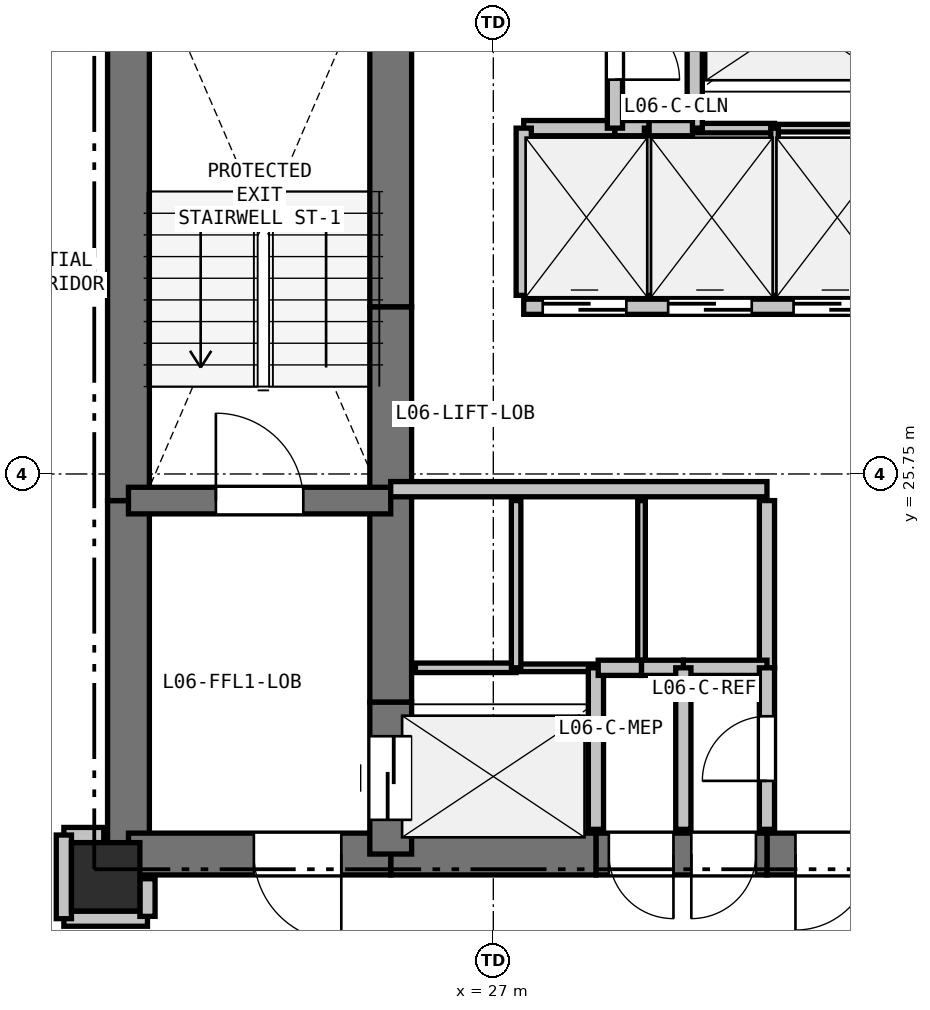
"""IFC4 building model, lengths in metres.
Left out: names, types, materials, properties, quantities, classifications, styles, units other than length and angle.
Written with IfcOpenShell. Run it as: python <this file> out.ifc"""

import sys

from ifc_helpers import new_model, si_unit, direction, frame, frame_2d, origin, origin_2d, place, context, subcontext, project, spatial, rectangle, extrude, element, fill, save


model = new_model("IFC4")
c1 = context("Model", 3, precision=1e-05, world=origin(), true_north=direction((0.0, 1.0)))
c2 = subcontext(c1, "Body", "Model", "MODEL_VIEW")
j1 = project(units=[si_unit("LENGTHUNIT", "METRE"), si_unit("PLANEANGLEUNIT", "RADIAN")], contexts=[c1])
p1 = place(None, origin())
s1 = spatial("IfcSite", under=j1, at=p1, CompositionType="ELEMENT")
p2 = place(p1, origin())
s2 = spatial("IfcBuilding", under=s1, at=p2, CompositionType="ELEMENT")
p3 = place(p2, frame((0.0, 0.0, 25.8)))
s3 = spatial("IfcBuildingStorey", under=s2, at=p3, CompositionType="ELEMENT", Elevation=25.8)
p4 = place(p3, frame((21.9, 20.45, 0.0), z_axis=(0.0, 0.0, 1.0), x_axis=(1.0, 0.0, 0.0)))
e1 = element("IfcColumn", 1, at=p4, inside=s3, PredefinedType="COLUMN", context=c2, shape_type="SweptSolid", body=[
    extrude(rectangle(XDim=0.9, YDim=0.9, at=origin_2d()), origin(), (0.0, 0.0, 1.0), 3.3),
])
p5 = place(p3, frame((22.2, 20.75, 0.0), z_axis=(0.0, 0.0, 1.0), x_axis=(0.0, 1.0, 0.0)))
e2 = element("IfcWall", 2, at=p5, inside=s3, PredefinedType="SHEAR", context=c2, shape_type="SweptSolid", body=[
    extrude(rectangle(XDim=4.65, YDim=0.55, at=frame_2d((2.325, 0.0))), origin(), (0.0, 0.0, 1.0), 3.04),
])
p6 = place(p3, frame((22.2, 25.4, 0.0), z_axis=(0.0, 0.0, 1.0), x_axis=(0.0, 1.0, 0.0)))
e3 = element("IfcWall", 3, at=p6, inside=s3, PredefinedType="SHEAR", context=c2, shape_type="SweptSolid", body=[
    extrude(rectangle(XDim=7.35, YDim=0.55, at=frame_2d((3.675, 0.0))), origin(), (0.0, 0.0, 1.0), 3.04),
])
p7 = place(p3, frame((32.35, 20.75, 0.0), z_axis=(0.0, 0.0, 1.0), x_axis=(-1.0, 0.0, 0.0)))
e4 = element("IfcWall", 4, at=p7, inside=s3, PredefinedType="SHEAR", context=c2, shape_type="SweptSolid", body=[
    extrude(rectangle(XDim=1.75, YDim=0.55, at=frame_2d((0.875, 0.0))), origin(), (0.0, 0.0, 1.0), 3.04),
])
p8 = place(p7, frame((0.375, 0.0, 0.0)))
e5 = element("IfcOpeningElement", 5, at=p8, cuts=e4, PredefinedType="OPENING", context=c2, shape_type="SweptSolid", body=[
    extrude(rectangle(XDim=1.0, YDim=2.15, at=frame_2d((0.5, 1.075))), frame((0.0, 0.285, 0.0), z_axis=(0.0, -1.0, 0.0), x_axis=(1.0, 0.0, 0.0)), (0.0, 0.0, 1.0), 0.57),
])
p9 = place(p3, frame((30.6, 20.75, 0.0), z_axis=(0.0, 0.0, 1.0), x_axis=(-1.0, 0.0, 0.0)))
e6 = element("IfcWall", 6, at=p9, inside=s3, PredefinedType="SHEAR", context=c2, shape_type="SweptSolid", body=[
    extrude(rectangle(XDim=2.25, YDim=0.55, at=frame_2d((1.125, 0.0))), origin(), (0.0, 0.0, 1.0), 3.04),
])
p10 = place(p9, frame((1.23, 0.0, 0.0)))
e7 = element("IfcOpeningElement", 7, at=p10, cuts=e6, PredefinedType="OPENING", context=c2, shape_type="SweptSolid", body=[
    extrude(rectangle(XDim=0.85, YDim=2.1, at=frame_2d((0.425, 1.05))), frame((0.0, 0.285, 0.0), z_axis=(0.0, -1.0, 0.0), x_axis=(1.0, 0.0, 0.0)), (0.0, 0.0, 1.0), 0.57),
])
p11 = place(p9, frame((0.145, 0.0, 0.0)))
e8 = element("IfcOpeningElement", 8, at=p11, cuts=e6, PredefinedType="OPENING", context=c2, shape_type="SweptSolid", body=[
    extrude(rectangle(XDim=0.85, YDim=2.1, at=frame_2d((0.425, 1.05))), frame((0.0, 0.285, 0.0), z_axis=(0.0, -1.0, 0.0), x_axis=(1.0, 0.0, 0.0)), (0.0, 0.0, 1.0), 0.57),
])
p12 = place(p3, frame((28.35, 20.75, 0.0), z_axis=(0.0, 0.0, 1.0), x_axis=(-1.0, 0.0, 0.0)))
e9 = element("IfcWall", 9, at=p12, inside=s3, PredefinedType="SHEAR", context=c2, shape_type="SweptSolid", body=[
    extrude(rectangle(XDim=2.7, YDim=0.55, at=frame_2d((1.35, 0.0))), origin(), (0.0, 0.0, 1.0), 3.04),
])
p13 = place(p3, frame((25.65, 20.75, 0.0), z_axis=(0.0, 0.0, 1.0), x_axis=(-1.0, 0.0, 0.0)))
e10 = element("IfcWall", 10, at=p13, inside=s3, PredefinedType="SHEAR", context=c2, shape_type="SweptSolid", body=[
    extrude(rectangle(XDim=3.45, YDim=0.55, at=frame_2d((1.725, 0.0))), origin(), (0.0, 0.0, 1.0), 3.04),
])
p14 = place(p13, frame((0.65, 0.0, 0.0)))
e11 = element("IfcOpeningElement", 11, at=p14, cuts=e10, PredefinedType="OPENING", context=c2, shape_type="SweptSolid", body=[
    extrude(rectangle(XDim=1.15, YDim=2.15, at=frame_2d((0.575, 1.075))), frame((0.0, 0.285, 0.0), z_axis=(0.0, -1.0, 0.0), x_axis=(1.0, 0.0, 0.0)), (0.0, 0.0, 1.0), 0.57),
])
p15 = place(p3, frame((25.65, 20.75, 0.0), z_axis=(0.0, 0.0, 1.0), x_axis=(0.0, 1.0, 0.0)))
e12 = element("IfcWall", 12, at=p15, inside=s3, PredefinedType="SHEAR", context=c2, shape_type="SweptSolid", body=[
    extrude(rectangle(XDim=2.0, YDim=0.55, at=frame_2d((1.0, 0.0))), origin(), (0.0, 0.0, 1.0), 3.04),
])
p16 = place(p15, frame((0.45, 0.0, 0.0)))
e13 = element("IfcOpeningElement", 13, at=p16, cuts=e12, PredefinedType="OPENING", context=c2, shape_type="SweptSolid", body=[
    extrude(rectangle(XDim=1.1, YDim=2.15, at=frame_2d((0.55, 1.075))), frame((0.0, 0.285, 0.0), z_axis=(0.0, -1.0, 0.0), x_axis=(1.0, 0.0, 0.0)), (0.0, 0.0, 1.0), 0.57),
])
p17 = place(p3, frame((25.65, 22.75, 0.0), z_axis=(0.0, 0.0, 1.0), x_axis=(0.0, 1.0, 0.0)))
e14 = element("IfcWall", 14, at=p17, inside=s3, PredefinedType="SHEAR", context=c2, shape_type="SweptSolid", body=[
    extrude(rectangle(XDim=2.8, YDim=0.55, at=frame_2d((1.4, 0.0))), origin(), (0.0, 0.0, 1.0), 3.04),
])
p18 = place(p3, frame((25.65, 25.55, 0.0), z_axis=(0.0, 0.0, 1.0), x_axis=(0.0, 1.0, 0.0)))
e15 = element("IfcWall", 15, at=p18, inside=s3, PredefinedType="SHEAR", context=c2, shape_type="SweptSolid", body=[
    extrude(rectangle(XDim=2.4, YDim=0.55, at=frame_2d((1.2, 0.0))), origin(), (0.0, 0.0, 1.0), 3.04),
])
p19 = place(p3, frame((25.65, 27.95, 0.0), z_axis=(0.0, 0.0, 1.0), x_axis=(0.0, 1.0, 0.0)))
e16 = element("IfcWall", 16, at=p19, inside=s3, PredefinedType="SHEAR", context=c2, shape_type="SweptSolid", body=[
    extrude(rectangle(XDim=4.8, YDim=0.55, at=frame_2d((2.4, 0.0))), origin(), (0.0, 0.0, 1.0), 3.04),
])
p20 = place(p3, frame((22.2, 25.4, 0.0), z_axis=(0.0, 0.0, 1.0), x_axis=(1.0, 0.0, 0.0)))
e17 = element("IfcWall", 17, at=p20, inside=s3, PredefinedType="SHEAR", context=c2, shape_type="SweptSolid", body=[
    extrude(rectangle(XDim=3.45, YDim=0.35, at=frame_2d((1.725, 0.0))), origin(), (0.0, 0.0, 1.0), 3.04),
])
p21 = place(p20, frame((1.15, 0.0, 0.0)))
e18 = element("IfcOpeningElement", 18, at=p21, cuts=e17, PredefinedType="OPENING", context=c2, shape_type="SweptSolid", body=[
    extrude(rectangle(XDim=1.15, YDim=2.15, at=frame_2d((0.575, 1.075))), frame((0.0, 0.185, 0.0), z_axis=(0.0, -1.0, 0.0), x_axis=(1.0, 0.0, 0.0)), (0.0, 0.0, 1.0), 0.37),
])
p22 = place(p3, frame((25.65, 25.55, 0.0), z_axis=(0.0, 0.0, 1.0), x_axis=(1.0, 0.0, 0.0)))
e19 = element("IfcWall", 19, at=p22, inside=s3, PredefinedType="PARTITIONING", context=c2, shape_type="SweptSolid", body=[
    extrude(rectangle(XDim=4.95, YDim=0.2, at=frame_2d((2.475, 0.0))), origin(), (0.0, 0.0, 1.0), 3.04),
])
p23 = place(p3, frame((27.4, 27.95, 0.0), z_axis=(0.0, 0.0, 1.0), x_axis=(1.0, 0.0, 0.0)))
e20 = element("IfcWall", 20, at=p23, inside=s3, PredefinedType="PARTITIONING", context=c2, shape_type="SweptSolid", body=[
    extrude(rectangle(XDim=4.95, YDim=0.2, at=frame_2d((2.475, 0.0))), origin(), (0.0, 0.0, 1.0), 3.04),
])
p24 = place(p23, frame((0.25, 0.0, 0.0)))
e21 = element("IfcOpeningElement", 21, at=p24, cuts=e20, PredefinedType="OPENING", context=c2, shape_type="SweptSolid", body=[
    extrude(rectangle(XDim=1.1, YDim=2.15, at=frame_2d((0.55, 1.075))), frame((0.0, 0.11, 0.0), z_axis=(0.0, -1.0, 0.0), x_axis=(1.0, 0.0, 0.0)), (0.0, 0.0, 1.0), 0.22),
])
p25 = place(p23, frame((1.9, 0.0, 0.0)))
e22 = element("IfcOpeningElement", 22, at=p25, cuts=e20, PredefinedType="OPENING", context=c2, shape_type="SweptSolid", body=[
    extrude(rectangle(XDim=1.1, YDim=2.15, at=frame_2d((0.55, 1.075))), frame((0.0, 0.11, 0.0), z_axis=(0.0, -1.0, 0.0), x_axis=(1.0, 0.0, 0.0)), (0.0, 0.0, 1.0), 0.22),
])
p26 = place(p23, frame((3.55, 0.0, 0.0)))
e23 = element("IfcOpeningElement", 23, at=p26, cuts=e20, PredefinedType="OPENING", context=c2, shape_type="SweptSolid", body=[
    extrude(rectangle(XDim=1.1, YDim=2.15, at=frame_2d((0.55, 1.075))), frame((0.0, 0.11, 0.0), z_axis=(0.0, -1.0, 0.0), x_axis=(1.0, 0.0, 0.0)), (0.0, 0.0, 1.0), 0.22),
])
p27 = place(p3, frame((25.975, 23.2, 0.0), z_axis=(0.0, 0.0, 1.0), x_axis=(1.0, 0.0, 0.0)))
e24 = element("IfcWall", 24, at=p27, inside=s3, PredefinedType="PARTITIONING", context=c2, shape_type="SweptSolid", body=[
    extrude(rectangle(XDim=1.325, YDim=0.125, at=frame_2d((0.663, 0.0))), origin(), (0.0, 0.0, 1.0), 3.04),
])
p28 = place(p3, frame((27.3, 23.2, 0.0), z_axis=(0.0, 0.0, 1.0), x_axis=(1.0, 0.0, 0.0)))
e25 = element("IfcWall", 25, at=p28, inside=s3, PredefinedType="PARTITIONING", context=c2, shape_type="SweptSolid", body=[
    extrude(rectangle(XDim=1.05, YDim=0.1, at=frame_2d((0.525, 0.0))), origin(), (0.0, 0.0, 1.0), 3.04),
])
p29 = place(p3, frame((28.35, 23.2, 0.0), z_axis=(0.0, 0.0, 1.0), x_axis=(0.0, -1.0, 0.0)))
e26 = element("IfcWall", 26, at=p29, inside=s3, PredefinedType="PARTITIONING", context=c2, shape_type="SweptSolid", body=[
    extrude(rectangle(XDim=2.125, YDim=0.2, at=frame_2d((1.062, 0.0))), origin(), (0.0, 0.0, 1.0), 3.04),
])
p30 = place(p3, frame((32.025, 30.3, 0.0), z_axis=(0.0, 0.0, 1.0), x_axis=(-1.0, 0.0, 0.0)))
e27 = element("IfcWall", 27, at=p30, inside=s3, PredefinedType="PARTITIONING", context=c2, shape_type="SweptSolid", body=[
    extrude(rectangle(XDim=1.325, YDim=0.1, at=frame_2d((0.663, 0.0))), origin(), (0.0, 0.0, 1.0), 3.04),
])
p31 = place(p3, frame((30.7, 30.3, 0.0), z_axis=(0.0, 0.0, 1.0), x_axis=(-1.0, 0.0, 0.0)))
e28 = element("IfcWall", 28, at=p31, inside=s3, PredefinedType="PARTITIONING", context=c2, shape_type="SweptSolid", body=[
    extrude(rectangle(XDim=1.05, YDim=0.125, at=frame_2d((0.525, 0.0))), origin(), (0.0, 0.0, 1.0), 3.04),
])
p32 = place(p3, frame((29.65, 30.3, 0.0), z_axis=(0.0, 0.0, 1.0), x_axis=(0.0, 1.0, 0.0)))
e29 = element("IfcWall", 29, at=p32, inside=s3, PredefinedType="PARTITIONING", context=c2, shape_type="SweptSolid", body=[
    extrude(rectangle(XDim=2.125, YDim=0.2, at=frame_2d((1.062, 0.0))), origin(), (0.0, 0.0, 1.0), 3.04),
])
p33 = place(p3, frame((27.3, 25.4, 0.0), z_axis=(0.0, 0.0, 1.0), x_axis=(0.0, -1.0, 0.0)))
e30 = element("IfcWall", 30, at=p33, inside=s3, PredefinedType="PARTITIONING", context=c2, shape_type="SweptSolid", body=[
    extrude(rectangle(XDim=2.2, YDim=0.125, at=frame_2d((1.1, 0.0))), origin(), (0.0, 0.0, 1.0), 3.04),
])
p34 = place(p3, frame((28.95, 25.4, 0.0), z_axis=(0.0, 0.0, 1.0), x_axis=(0.0, -1.0, 0.0)))
e31 = element("IfcWall", 31, at=p34, inside=s3, PredefinedType="PARTITIONING", context=c2, shape_type="SweptSolid", body=[
    extrude(rectangle(XDim=2.2, YDim=0.1, at=frame_2d((1.1, 0.0))), origin(), (0.0, 0.0, 1.0), 3.04),
])
p35 = place(p3, frame((28.95, 23.2, 0.0), z_axis=(0.0, 0.0, 1.0), x_axis=(-1.0, 0.0, 0.0)))
e32 = element("IfcWall", 32, at=p35, inside=s3, PredefinedType="PARTITIONING", context=c2, shape_type="SweptSolid", body=[
    extrude(rectangle(XDim=0.57, YDim=0.2, at=frame_2d((0.285, 0.0))), origin(), (0.0, 0.0, 1.0), 3.04),
])
p36 = place(p3, frame((30.6, 25.4, 0.0), z_axis=(0.0, 0.0, 1.0), x_axis=(0.0, -1.0, 0.0)))
e33 = element("IfcWall", 33, at=p36, inside=s3, PredefinedType="PARTITIONING", context=c2, shape_type="SweptSolid", body=[
    extrude(rectangle(XDim=2.2, YDim=0.2, at=frame_2d((1.1, 0.0))), origin(), (0.0, 0.0, 1.0), 3.04),
])
p37 = place(p3, frame((30.6, 23.2, 0.0), z_axis=(0.0, 0.0, 1.0), x_axis=(-1.0, 0.0, 0.0)))
e34 = element("IfcWall", 34, at=p37, inside=s3, PredefinedType="PARTITIONING", context=c2, shape_type="SweptSolid", body=[
    extrude(rectangle(XDim=1.1, YDim=0.2, at=frame_2d((0.55, 0.0))), origin(), (0.0, 0.0, 1.0), 3.04),
])
p38 = place(p3, frame((29.5, 23.2, 0.0), z_axis=(0.0, 0.0, 1.0), x_axis=(-1.0, 0.0, 0.0)))
e35 = element("IfcWall", 35, at=p38, inside=s3, PredefinedType="PARTITIONING", context=c2, shape_type="SweptSolid", body=[
    extrude(rectangle(XDim=0.55, YDim=0.2, at=frame_2d((0.275, 0.0))), origin(), (0.0, 0.0, 1.0), 3.04),
])
p39 = place(p3, frame((27.4, 30.3, 0.0), z_axis=(0.0, 0.0, 1.0), x_axis=(1.0, 0.0, 0.0)))
e36 = element("IfcWall", 36, at=p39, inside=s3, PredefinedType="PARTITIONING", context=c2, shape_type="SweptSolid", body=[
    extrude(rectangle(XDim=1.2, YDim=0.2, at=frame_2d((0.6, 0.0))), origin(), (0.0, 0.0, 1.0), 3.04),
])
p40 = place(p3, frame((28.6, 30.3, 0.0), z_axis=(0.0, 0.0, 1.0), x_axis=(1.0, 0.0, 0.0)))
e37 = element("IfcWall", 37, at=p40, inside=s3, PredefinedType="PARTITIONING", context=c2, shape_type="SweptSolid", body=[
    extrude(rectangle(XDim=0.45, YDim=0.2, at=frame_2d((0.225, 0.0))), origin(), (0.0, 0.0, 1.0), 3.04),
])
p41 = place(p3, frame((29.05, 30.3, 0.0), z_axis=(0.0, 0.0, 1.0), x_axis=(0.0, -1.0, 0.0)))
e38 = element("IfcWall", 38, at=p41, inside=s3, PredefinedType="PARTITIONING", context=c2, shape_type="SweptSolid", body=[
    extrude(rectangle(XDim=2.2, YDim=0.125, at=frame_2d((1.1, 0.0))), origin(), (0.0, 0.0, 1.0), 3.04),
])
p42 = place(p3, frame((27.4, 28.1, 0.0), z_axis=(0.0, 0.0, 1.0), x_axis=(0.0, 1.0, 0.0)))
e39 = element("IfcWall", 39, at=p42, inside=s3, PredefinedType="PARTITIONING", context=c2, shape_type="SweptSolid", body=[
    extrude(rectangle(XDim=2.2, YDim=0.2, at=frame_2d((1.1, 0.0))), origin(), (0.0, 0.0, 1.0), 3.04),
])
p43 = place(p3, frame((29.05, 30.3, 0.0), z_axis=(0.0, 0.0, 1.0), x_axis=(1.0, 0.0, 0.0)))
e40 = element("IfcWall", 40, at=p43, inside=s3, PredefinedType="PARTITIONING", context=c2, shape_type="SweptSolid", body=[
    extrude(rectangle(XDim=0.57, YDim=0.2, at=frame_2d((0.285, 0.0))), origin(), (0.0, 0.0, 1.0), 3.04),
])
p44 = place(p3, frame((30.7, 30.3, 0.0), z_axis=(0.0, 0.0, 1.0), x_axis=(0.0, -1.0, 0.0)))
e41 = element("IfcWall", 41, at=p44, inside=s3, PredefinedType="PARTITIONING", context=c2, shape_type="SweptSolid", body=[
    extrude(rectangle(XDim=2.2, YDim=0.1, at=frame_2d((1.1, 0.0))), origin(), (0.0, 0.0, 1.0), 3.04),
])
p45 = place(p3, frame((30.6, 21.075, 0.0), z_axis=(0.0, 0.0, 1.0), x_axis=(0.0, 1.0, 0.0)))
e42 = element("IfcWall", 42, at=p45, inside=s3, PredefinedType="PARTITIONING", context=c2, shape_type="SweptSolid", body=[
    extrude(rectangle(XDim=2.125, YDim=0.2, at=frame_2d((1.062, 0.0))), origin(), (0.0, 0.0, 1.0), 3.04),
])
p46 = place(p45, frame((0.637, 0.0, 0.0)))
e43 = element("IfcOpeningElement", 43, at=p46, cuts=e42, PredefinedType="OPENING", context=c2, shape_type="SweptSolid", body=[
    extrude(rectangle(XDim=0.85, YDim=2.1, at=frame_2d((0.425, 1.05))), frame((0.0, 0.11, 0.0), z_axis=(0.0, -1.0, 0.0), x_axis=(1.0, 0.0, 0.0)), (0.0, 0.0, 1.0), 0.22),
])
p47 = place(p3, frame((28.6, 32.425, 0.0), z_axis=(0.0, 0.0, 1.0), x_axis=(0.0, -1.0, 0.0)))
e44 = element("IfcWall", 44, at=p47, inside=s3, PredefinedType="PARTITIONING", context=c2, shape_type="SweptSolid", body=[
    extrude(rectangle(XDim=2.125, YDim=0.2, at=frame_2d((1.062, 0.0))), origin(), (0.0, 0.0, 1.0), 3.04),
])
p48 = place(p47, frame((0.637, 0.0, 0.0)))
e45 = element("IfcOpeningElement", 45, at=p48, cuts=e44, PredefinedType="OPENING", context=c2, shape_type="SweptSolid", body=[
    extrude(rectangle(XDim=0.85, YDim=2.1, at=frame_2d((0.425, 1.05))), frame((0.0, 0.11, 0.0), z_axis=(0.0, -1.0, 0.0), x_axis=(1.0, 0.0, 0.0)), (0.0, 0.0, 1.0), 0.22),
])
p49 = place(p3, frame((21.35, 19.9, 0.0), z_axis=(0.0, 0.0, 1.0), x_axis=(1.0, 0.0, 0.0)))
e46 = element("IfcWall", 46, at=p49, inside=s3, PredefinedType="PARTITIONING", context=c2, shape_type="SweptSolid", body=[
    extrude(rectangle(XDim=1.1, YDim=0.2, at=frame_2d((0.55, 0.0))), origin(), (0.0, 0.0, 1.0), 2.337),
])
p50 = place(p3, frame((22.45, 19.93, 0.0), z_axis=(0.0, 0.0, 1.0), x_axis=(0.0, 1.0, 0.0)))
e47 = element("IfcWall", 47, at=p50, inside=s3, PredefinedType="PARTITIONING", context=c2, shape_type="SweptSolid", body=[
    extrude(rectangle(XDim=0.495, YDim=0.2, at=frame_2d((0.248, 0.0))), origin(), (0.0, 0.0, 1.0), 2.337),
])
p51 = place(p3, frame((21.875, 21.0, 0.0), z_axis=(0.0, 0.0, 1.0), x_axis=(-1.0, 0.0, 0.0)))
e48 = element("IfcWall", 48, at=p51, inside=s3, PredefinedType="PARTITIONING", context=c2, shape_type="SweptSolid", body=[
    extrude(rectangle(XDim=0.525, YDim=0.2, at=frame_2d((0.262, 0.0))), origin(), (0.0, 0.0, 1.0), 2.488),
])
p52 = place(p3, frame((21.35, 21.0, 0.0), z_axis=(0.0, 0.0, 1.0), x_axis=(0.0, -1.0, 0.0)))
e49 = element("IfcWall", 49, at=p52, inside=s3, PredefinedType="PARTITIONING", context=c2, shape_type="SweptSolid", body=[
    extrude(rectangle(XDim=1.1, YDim=0.2, at=frame_2d((0.55, 0.0))), origin(), (0.0, 0.0, 1.0), 2.337),
])
p53 = place(p3, frame((29.5, 23.2, 0.0), z_axis=(0.0, 0.0, 1.0), x_axis=(0.0, -1.0, 0.0)))
e50 = element("IfcWall", 50, at=p53, inside=s3, PredefinedType="PARTITIONING", context=c2, shape_type="SweptSolid", body=[
    extrude(rectangle(XDim=2.125, YDim=0.2, at=frame_2d((1.062, 0.0))), origin(), (0.0, 0.0, 1.0), 3.04),
])
p54 = place(p24, origin())
e51 = element("IfcDoor", 51, at=p54, inside=s3, OperationType="SLIDING_TO_LEFT", PredefinedType="DOOR", context=c2, shape_type="SweptSolid", body=[
    extrude(rectangle(XDim=1.1, YDim=2.15, at=frame_2d((0.55, 1.075))), frame((0.0, 0.025, 0.0), z_axis=(0.0, -1.0, 0.0), x_axis=(1.0, 0.0, 0.0)), (0.0, 0.0, 1.0), 0.05),
])
fill(e21, e51)
p55 = place(p25, origin())
e52 = element("IfcDoor", 52, at=p55, inside=s3, OperationType="SLIDING_TO_LEFT", PredefinedType="DOOR", context=c2, shape_type="SweptSolid", body=[
    extrude(rectangle(XDim=1.1, YDim=2.15, at=frame_2d((0.55, 1.075))), frame((0.0, 0.025, 0.0), z_axis=(0.0, -1.0, 0.0), x_axis=(1.0, 0.0, 0.0)), (0.0, 0.0, 1.0), 0.05),
])
fill(e22, e52)
p56 = place(p26, origin())
e53 = element("IfcDoor", 53, at=p56, inside=s3, OperationType="SLIDING_TO_LEFT", PredefinedType="DOOR", context=c2, shape_type="SweptSolid", body=[
    extrude(rectangle(XDim=1.1, YDim=2.15, at=frame_2d((0.55, 1.075))), frame((0.0, 0.025, 0.0), z_axis=(0.0, -1.0, 0.0), x_axis=(1.0, 0.0, 0.0)), (0.0, 0.0, 1.0), 0.05),
])
fill(e23, e53)
p57 = place(p8, origin())
e54 = element("IfcDoor", 54, at=p57, inside=s3, OperationType="SINGLE_SWING_RIGHT", PredefinedType="DOOR", context=c2, shape_type="SweptSolid", body=[
    extrude(rectangle(XDim=1.0, YDim=2.15, at=frame_2d((0.5, 1.075))), frame((0.0, 0.025, 0.0), z_axis=(0.0, -1.0, 0.0), x_axis=(1.0, 0.0, 0.0)), (0.0, 0.0, 1.0), 0.05),
])
fill(e5, e54)
p58 = place(p16, origin())
e55 = element("IfcDoor", 55, at=p58, inside=s3, OperationType="SLIDING_TO_LEFT", PredefinedType="DOOR", context=c2, shape_type="SweptSolid", body=[
    extrude(rectangle(XDim=1.1, YDim=2.15, at=frame_2d((0.55, 1.075))), frame((0.0, 0.025, 0.0), z_axis=(0.0, -1.0, 0.0), x_axis=(1.0, 0.0, 0.0)), (0.0, 0.0, 1.0), 0.05),
])
fill(e13, e55)
p59 = place(p21, origin())
e56 = element("IfcDoor", 56, at=p59, inside=s3, OperationType="SINGLE_SWING_LEFT", PredefinedType="DOOR", context=c2, shape_type="SweptSolid", body=[
    extrude(rectangle(XDim=1.15, YDim=2.15, at=frame_2d((0.575, 1.075))), frame((0.0, 0.025, 0.0), z_axis=(0.0, -1.0, 0.0), x_axis=(1.0, 0.0, 0.0)), (0.0, 0.0, 1.0), 0.05),
])
fill(e18, e56)
p60 = place(p14, origin())
e57 = element("IfcDoor", 57, at=p60, inside=s3, OperationType="SINGLE_SWING_LEFT", PredefinedType="DOOR", context=c2, shape_type="SweptSolid", body=[
    extrude(rectangle(XDim=1.15, YDim=2.15, at=frame_2d((0.575, 1.075))), frame((0.0, 0.025, 0.0), z_axis=(0.0, -1.0, 0.0), x_axis=(1.0, 0.0, 0.0)), (0.0, 0.0, 1.0), 0.05),
])
fill(e11, e57)
p61 = place(p46, origin())
e58 = element("IfcDoor", 58, at=p61, inside=s3, OperationType="SINGLE_SWING_LEFT", PredefinedType="DOOR", context=c2, shape_type="SweptSolid", body=[
    extrude(rectangle(XDim=0.85, YDim=2.1, at=frame_2d((0.425, 1.05))), frame((0.0, 0.025, 0.0), z_axis=(0.0, -1.0, 0.0), x_axis=(1.0, 0.0, 0.0)), (0.0, 0.0, 1.0), 0.05),
])
fill(e43, e58)
p62 = place(p48, origin())
e59 = element("IfcDoor", 59, at=p62, inside=s3, OperationType="SINGLE_SWING_RIGHT", PredefinedType="DOOR", context=c2, shape_type="SweptSolid", body=[
    extrude(rectangle(XDim=0.85, YDim=2.1, at=frame_2d((0.425, 1.05))), frame((0.0, 0.025, 0.0), z_axis=(0.0, -1.0, 0.0), x_axis=(1.0, 0.0, 0.0)), (0.0, 0.0, 1.0), 0.05),
])
fill(e45, e59)
p63 = place(p10, origin())
e60 = element("IfcDoor", 60, at=p63, inside=s3, OperationType="SINGLE_SWING_LEFT", PredefinedType="DOOR", context=c2, shape_type="SweptSolid", body=[
    extrude(rectangle(XDim=0.85, YDim=2.1, at=frame_2d((0.425, 1.05))), frame((0.0, 0.025, 0.0), z_axis=(0.0, -1.0, 0.0), x_axis=(1.0, 0.0, 0.0)), (0.0, 0.0, 1.0), 0.05),
])
fill(e7, e60)
p64 = place(p11, origin())
e61 = element("IfcDoor", 61, at=p64, inside=s3, OperationType="SINGLE_SWING_RIGHT", PredefinedType="DOOR", context=c2, shape_type="SweptSolid", body=[
    extrude(rectangle(XDim=0.85, YDim=2.1, at=frame_2d((0.425, 1.05))), frame((0.0, 0.025, 0.0), z_axis=(0.0, -1.0, 0.0), x_axis=(1.0, 0.0, 0.0)), (0.0, 0.0, 1.0), 0.05),
])
fill(e8, e61)
save(model, sys.argv[1])
